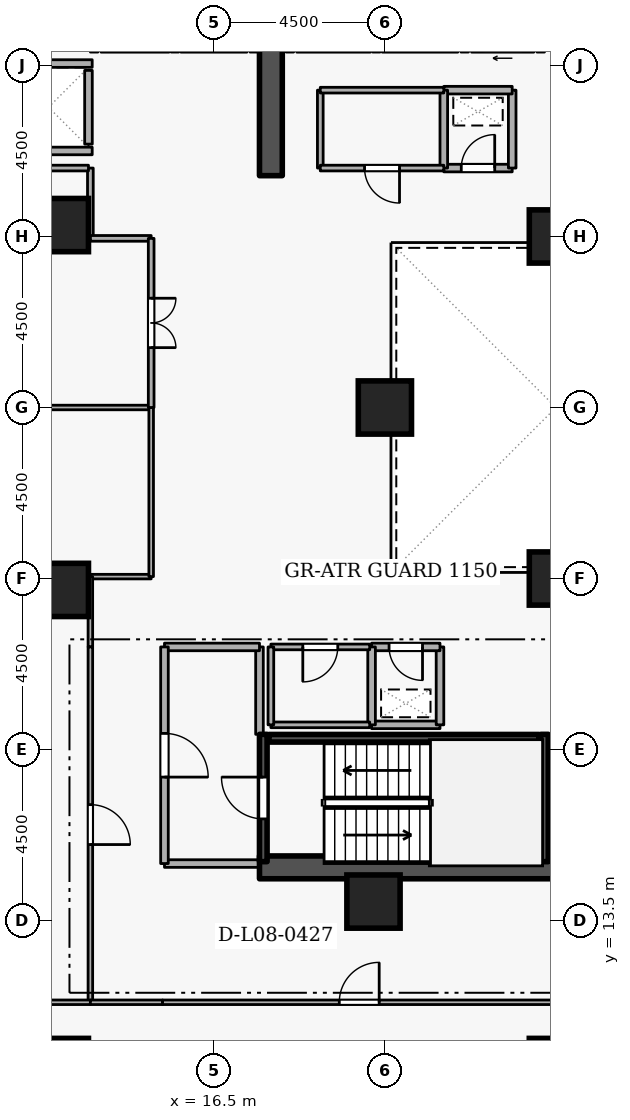
"""IFC4 building model, lengths in metres.
Left out: names, types, materials, properties, quantities, classifications, styles, units other than length and angle.
Written with IfcOpenShell. Run it as: python <this file> out.ifc"""

import sys

from ifc_helpers import new_model, si_unit, direction, frame, frame_2d, origin, origin_2d, place, context, subcontext, project, spatial, rectangle, extrude, element, fill, save


model = new_model("IFC4")
c1 = context("Model", 3, precision=1e-05, world=origin(), true_north=direction((0.0, 1.0)))
c2 = subcontext(c1, "Body", "Model", "MODEL_VIEW")
j1 = project(units=[si_unit("LENGTHUNIT", "METRE"), si_unit("PLANEANGLEUNIT", "RADIAN")], contexts=[c1])
p1 = place(None, origin())
s1 = spatial("IfcSite", under=j1, at=p1, CompositionType="ELEMENT")
p2 = place(p1, origin())
s2 = spatial("IfcBuilding", under=s1, at=p2, CompositionType="ELEMENT")
p3 = place(p2, frame((0.0, 0.0, 35.1)))
s3 = spatial("IfcBuildingStorey", under=s2, at=p3, CompositionType="ELEMENT", Elevation=35.1)
p4 = place(p3, frame((17.7, 14.9, 0.0), z_axis=(0.0, 0.0, 1.0), x_axis=(1.0, 0.0, 0.0)))
e1 = element("IfcWall", 1, at=p4, inside=s3, PredefinedType="SHEAR", context=c2, shape_type="SweptSolid", body=[
    extrude(rectangle(XDim=15.6, YDim=0.6, at=frame_2d((7.8, 0.0))), origin(), (0.0, 0.0, 1.0), 3.6),
])
p5 = place(p3, frame((18.0, 33.1, 0.0), z_axis=(0.0, 0.0, 1.0), x_axis=(0.0, 1.0, 0.0)))
e2 = element("IfcWall", 2, at=p5, inside=s3, PredefinedType="SHEAR", context=c2, shape_type="SweptSolid", body=[
    extrude(rectangle(XDim=5.7, YDim=0.6, at=frame_2d((2.85, 0.0))), origin(), (0.0, 0.0, 1.0), 3.6),
])
for number, where, z_axis, x_axis in (
    (3, (12.5, 9.7, 0.0), (0.0, 0.0, 1.0), (1.0, 0.0, 0.0)),
    (4, (25.5, 9.7, 0.0), (0.0, 0.0, 1.0), (1.0, 0.0, 0.0)),
    (5, (12.5, 22.2, 0.0), (0.0, 0.0, 1.0), (1.0, 0.0, 0.0)),
    (6, (12.5, 31.8, 0.0), (0.0, 0.0, 1.0), (1.0, 0.0, 0.0)),
    (7, (20.7, 14.0, 0.0), (0.0, 0.0, 1.0), (1.0, 0.0, 0.0)),
    (8, (25.5, 22.5, 0.0), (0.0, 0.0, 1.0), (1.0, 0.0, 0.0)),
    (9, (25.5, 31.5, 0.0), (0.0, 0.0, 1.0), (1.0, 0.0, 0.0)),
    (10, (21.0, 27.0, 0.0), (0.0, 0.0, 1.0), (1.0, 0.0, 0.0)),
):
    element("IfcColumn", number, at=place(p3, frame(where, z_axis=z_axis, x_axis=x_axis)), inside=s3, PredefinedType="COLUMN", context=c2, shape_type="SweptSolid", body=[
        extrude(rectangle(XDim=1.4, YDim=1.4, at=origin_2d()), origin(), (0.0, 0.0, 1.0), 3.6),
    ])
p6 = place(p3, frame((24.92, 36.45, 0.0), z_axis=(0.0, 0.0, 1.0), x_axis=(-1.0, 0.0, 0.0)))
e11 = element("IfcWall", 11, at=p6, inside=s3, PredefinedType="STANDARD", context=c2, shape_type="SweptSolid", body=[
    extrude(rectangle(XDim=1.64, YDim=0.2, at=frame_2d((0.82, 0.0))), origin(), (0.0, 0.0, 1.0), 3.34),
])
p7 = place(p6, frame((0.31, 0.0, 0.0)))
e12 = element("IfcOpeningElement", 12, at=p7, cuts=e11, PredefinedType="OPENING", context=c2, shape_type="SweptSolid", body=[
    extrude(rectangle(XDim=1.02, YDim=2.06, at=frame_2d((0.51, 1.03))), frame((0.0, 0.11, 0.0), z_axis=(0.0, -1.0, 0.0), x_axis=(1.0, 0.0, 0.0)), (0.0, 0.0, 1.0), 0.22),
])
p8 = place(p3, frame((22.92, 36.45, 0.0), z_axis=(0.0, 0.0, 1.0), x_axis=(-1.0, 0.0, 0.0)))
e13 = element("IfcWall", 13, at=p8, inside=s3, PredefinedType="STANDARD", context=c2, shape_type="SweptSolid", body=[
    extrude(rectangle(XDim=1.99, YDim=0.2, at=frame_2d((0.995, 0.0))), origin(), (0.0, 0.0, 1.0), 3.34),
])
p9 = place(p3, frame((20.62, 36.45, 0.0), z_axis=(0.0, 0.0, 1.0), x_axis=(-1.0, 0.0, 0.0)))
e14 = element("IfcWall", 14, at=p9, inside=s3, PredefinedType="STANDARD", context=c2, shape_type="SweptSolid", body=[
    extrude(rectangle(XDim=1.94, YDim=0.2, at=frame_2d((0.97, 0.0))), origin(), (0.0, 0.0, 1.0), 3.34),
])
p10 = place(p3, frame((17.37, 36.45, 0.0), z_axis=(0.0, 0.0, 1.0), x_axis=(-1.0, 0.0, 0.0)))
e15 = element("IfcWall", 15, at=p10, inside=s3, PredefinedType="STANDARD", context=c2, shape_type="SweptSolid", body=[
    extrude(rectangle(XDim=1.74, YDim=0.2, at=frame_2d((0.87, 0.0))), origin(), (0.0, 0.0, 1.0), 3.34),
])
p11 = place(p3, frame((15.32, 36.45, 0.0), z_axis=(0.0, 0.0, 1.0), x_axis=(-1.0, 0.0, 0.0)))
e16 = element("IfcWall", 16, at=p11, inside=s3, PredefinedType="STANDARD", context=c2, shape_type="SweptSolid", body=[
    extrude(rectangle(XDim=1.79, YDim=0.2, at=frame_2d((0.895, 0.0))), origin(), (0.0, 0.0, 1.0), 3.34),
])
p12 = place(p3, frame((13.2, 33.93, 0.0), z_axis=(0.0, 0.0, 1.0), x_axis=(0.0, 1.0, 0.0)))
e17 = element("IfcWall", 17, at=p12, inside=s3, PredefinedType="STANDARD", context=c2, shape_type="SweptSolid", body=[
    extrude(rectangle(XDim=1.94, YDim=0.2, at=frame_2d((0.97, 0.0))), origin(), (0.0, 0.0, 1.0), 3.34),
])
for number, where, z_axis, x_axis in (
    (18, (11.002, 36.05, 0.0), (0.0, 0.0, 1.0), (1.0, 0.0, 0.0)),
    (19, (11.002, 33.75, 0.0), (0.0, 0.0, 1.0), (1.0, 0.0, 0.0)),
):
    element("IfcWall", number, at=place(p3, frame(where, z_axis=z_axis, x_axis=x_axis)), inside=s3, PredefinedType="STANDARD", context=c2, shape_type="SweptSolid", body=[
        extrude(rectangle(XDim=2.296, YDim=0.2, at=frame_2d((1.148, 0.0))), origin(), (0.0, 0.0, 1.0), 3.34),
    ])
p13 = place(p3, frame((17.8, 15.05, 0.0), z_axis=(0.0, 0.0, 1.0), x_axis=(0.0, 1.0, 0.0)))
e20 = element("IfcWall", 20, at=p13, inside=s3, PredefinedType="SHEAR", context=c2, shape_type="SweptSolid", body=[
    extrude(rectangle(XDim=3.35, YDim=0.2, at=frame_2d((1.675, 0.0))), origin(), (0.0, 0.0, 1.0), 3.6),
])
p14 = place(p13, frame((1.125, 0.0, 0.0)))
e21 = element("IfcOpeningElement", 21, at=p14, cuts=e20, PredefinedType="OPENING", context=c2, shape_type="SweptSolid", body=[
    extrude(rectangle(XDim=1.1, YDim=2.1, at=frame_2d((0.55, 1.05))), frame((0.0, 0.11, 0.0), z_axis=(0.0, -1.0, 0.0), x_axis=(1.0, 0.0, 0.0)), (0.0, 0.0, 1.0), 0.22),
])
p15 = place(p3, frame((25.2, 18.4, 0.0), z_axis=(0.0, 0.0, 1.0), x_axis=(0.0, -1.0, 0.0)))
e22 = element("IfcWall", 22, at=p15, inside=s3, PredefinedType="SHEAR", context=c2, shape_type="SweptSolid", body=[
    extrude(rectangle(XDim=3.35, YDim=0.2, at=frame_2d((1.675, 0.0))), origin(), (0.0, 0.0, 1.0), 3.6),
])
p16 = place(p3, frame((25.05, 18.297, 0.0), z_axis=(0.0, 0.0, 1.0), x_axis=(-1.0, 0.0, 0.0)))
e23 = element("IfcWall", 23, at=p16, inside=s3, PredefinedType="SHEAR", context=c2, shape_type="SweptSolid", body=[
    extrude(rectangle(XDim=7.1, YDim=0.2, at=frame_2d((3.55, 0.0))), origin(), (0.0, 0.0, 1.0), 3.6),
])
p17 = place(p3, frame((15.2, 15.0, 0.0), z_axis=(0.0, 0.0, 1.0), x_axis=(1.0, 0.0, 0.0)))
e24 = element("IfcWall", 24, at=p17, inside=s3, PredefinedType="STANDARD", context=c2, shape_type="SweptSolid", body=[
    extrude(rectangle(XDim=2.5, YDim=0.2, at=frame_2d((1.25, 0.0))), origin(), (0.0, 0.0, 1.0), 3.34),
])
p18 = place(p3, frame((17.7, 18.4, 0.0), z_axis=(0.0, 0.0, 1.0), x_axis=(0.0, 1.0, 0.0)))
e25 = element("IfcWall", 25, at=p18, inside=s3, PredefinedType="STANDARD", context=c2, shape_type="SweptSolid", body=[
    extrude(rectangle(XDim=2.3, YDim=0.2, at=frame_2d((1.15, 0.0))), origin(), (0.0, 0.0, 1.0), 2.545),
])
p19 = place(p3, frame((17.7, 20.7, 0.0), z_axis=(0.0, 0.0, 1.0), x_axis=(-1.0, 0.0, 0.0)))
e26 = element("IfcWall", 26, at=p19, inside=s3, PredefinedType="STANDARD", context=c2, shape_type="SweptSolid", body=[
    extrude(rectangle(XDim=2.5, YDim=0.2, at=frame_2d((1.25, 0.0))), origin(), (0.0, 0.0, 1.0), 3.34),
])
p20 = place(p3, frame((15.2, 20.7, 0.0), z_axis=(0.0, 0.0, 1.0), x_axis=(0.0, -1.0, 0.0)))
e27 = element("IfcWall", 27, at=p20, inside=s3, PredefinedType="STANDARD", context=c2, shape_type="SweptSolid", body=[
    extrude(rectangle(XDim=5.7, YDim=0.2, at=frame_2d((2.85, 0.0))), origin(), (0.0, 0.0, 1.0), 3.34),
])
p21 = place(p20, frame((2.275, 0.0, 0.0)))
e28 = element("IfcOpeningElement", 28, at=p21, cuts=e27, PredefinedType="OPENING", context=c2, shape_type="SweptSolid", body=[
    extrude(rectangle(XDim=1.15, YDim=2.1, at=frame_2d((0.575, 1.05))), frame((0.0, 0.11, 0.0), z_axis=(0.0, -1.0, 0.0), x_axis=(1.0, 0.0, 0.0)), (0.0, 0.0, 1.0), 0.22),
])
p22 = place(p3, frame((20.65, 18.65, 0.0), z_axis=(0.0, 0.0, 1.0), x_axis=(1.0, 0.0, 0.0)))
e29 = element("IfcWall", 29, at=p22, inside=s3, PredefinedType="STANDARD", context=c2, shape_type="SweptSolid", body=[
    extrude(rectangle(XDim=1.8, YDim=0.2, at=frame_2d((0.9, 0.0))), origin(), (0.0, 0.0, 1.0), 3.34),
])
p23 = place(p3, frame((22.45, 18.65, 0.0), z_axis=(0.0, 0.0, 1.0), x_axis=(0.0, 1.0, 0.0)))
e30 = element("IfcWall", 30, at=p23, inside=s3, PredefinedType="STANDARD", context=c2, shape_type="SweptSolid", body=[
    extrude(rectangle(XDim=2.05, YDim=0.2, at=frame_2d((1.025, 0.0))), origin(), (0.0, 0.0, 1.0), 3.34),
])
p24 = place(p3, frame((22.45, 20.7, 0.0), z_axis=(0.0, 0.0, 1.0), x_axis=(-1.0, 0.0, 0.0)))
e31 = element("IfcWall", 31, at=p24, inside=s3, PredefinedType="STANDARD", context=c2, shape_type="SweptSolid", body=[
    extrude(rectangle(XDim=1.8, YDim=0.2, at=frame_2d((0.9, 0.0))), origin(), (0.0, 0.0, 1.0), 3.34),
])
p25 = place(p24, frame((0.46, 0.0, 0.0)))
e32 = element("IfcOpeningElement", 32, at=p25, cuts=e31, PredefinedType="OPENING", context=c2, shape_type="SweptSolid", body=[
    extrude(rectangle(XDim=0.88, YDim=2.04, at=frame_2d((0.44, 1.02))), frame((0.0, 0.11, 0.0), z_axis=(0.0, -1.0, 0.0), x_axis=(1.0, 0.0, 0.0)), (0.0, 0.0, 1.0), 0.22),
])
p26 = place(p3, frame((20.65, 20.7, 0.0), z_axis=(0.0, 0.0, 1.0), x_axis=(0.0, -1.0, 0.0)))
e33 = element("IfcWall", 33, at=p26, inside=s3, PredefinedType="STANDARD", context=c2, shape_type="SweptSolid", body=[
    extrude(rectangle(XDim=2.05, YDim=0.2, at=frame_2d((1.025, 0.0))), origin(), (0.0, 0.0, 1.0), 3.34),
])
p27 = place(p3, frame((22.55, 33.3, 0.0), z_axis=(0.0, 0.0, 1.0), x_axis=(1.0, 0.0, 0.0)))
e34 = element("IfcWall", 34, at=p27, inside=s3, PredefinedType="STANDARD", context=c2, shape_type="SweptSolid", body=[
    extrude(rectangle(XDim=1.8, YDim=0.2, at=frame_2d((0.9, 0.0))), origin(), (0.0, 0.0, 1.0), 3.34),
])
p28 = place(p27, frame((0.46, 0.0, 0.0)))
e35 = element("IfcOpeningElement", 35, at=p28, cuts=e34, PredefinedType="OPENING", context=c2, shape_type="SweptSolid", body=[
    extrude(rectangle(XDim=0.88, YDim=2.04, at=frame_2d((0.44, 1.02))), frame((0.0, 0.11, 0.0), z_axis=(0.0, -1.0, 0.0), x_axis=(1.0, 0.0, 0.0)), (0.0, 0.0, 1.0), 0.22),
])
p29 = place(p3, frame((24.35, 33.3, 0.0), z_axis=(0.0, 0.0, 1.0), x_axis=(0.0, 1.0, 0.0)))
e36 = element("IfcWall", 36, at=p29, inside=s3, PredefinedType="STANDARD", context=c2, shape_type="SweptSolid", body=[
    extrude(rectangle(XDim=2.05, YDim=0.2, at=frame_2d((1.025, 0.0))), origin(), (0.0, 0.0, 1.0), 3.34),
])
p30 = place(p3, frame((24.35, 35.35, 0.0), z_axis=(0.0, 0.0, 1.0), x_axis=(-1.0, 0.0, 0.0)))
e37 = element("IfcWall", 37, at=p30, inside=s3, PredefinedType="STANDARD", context=c2, shape_type="SweptSolid", body=[
    extrude(rectangle(XDim=1.8, YDim=0.2, at=frame_2d((0.9, 0.0))), origin(), (0.0, 0.0, 1.0), 3.34),
])
p31 = place(p3, frame((22.55, 35.35, 0.0), z_axis=(0.0, 0.0, 1.0), x_axis=(0.0, -1.0, 0.0)))
e38 = element("IfcWall", 38, at=p31, inside=s3, PredefinedType="STANDARD", context=c2, shape_type="SweptSolid", body=[
    extrude(rectangle(XDim=2.05, YDim=0.2, at=frame_2d((1.025, 0.0))), origin(), (0.0, 0.0, 1.0), 3.34),
])
p32 = place(p3, frame((18.0, 18.65, 0.0), z_axis=(0.0, 0.0, 1.0), x_axis=(1.0, 0.0, 0.0)))
e39 = element("IfcWall", 39, at=p32, inside=s3, PredefinedType="PARTITIONING", context=c2, shape_type="SweptSolid", body=[
    extrude(rectangle(XDim=2.6, YDim=0.15, at=frame_2d((1.3, 0.0))), origin(), (0.0, 0.0, 1.0), 3.34),
])
p33 = place(p3, frame((20.6, 20.7, 0.0), z_axis=(0.0, 0.0, 1.0), x_axis=(-1.0, 0.0, 0.0)))
e40 = element("IfcWall", 40, at=p33, inside=s3, PredefinedType="PARTITIONING", context=c2, shape_type="SweptSolid", body=[
    extrude(rectangle(XDim=2.6, YDim=0.15, at=frame_2d((1.3, 0.0))), origin(), (0.0, 0.0, 1.0), 3.34),
])
p34 = place(p33, frame((0.84, 0.0, 0.0)))
e41 = element("IfcOpeningElement", 41, at=p34, cuts=e40, PredefinedType="OPENING", context=c2, shape_type="SweptSolid", body=[
    extrude(rectangle(XDim=0.92, YDim=2.08, at=frame_2d((0.46, 1.04))), frame((0.0, 0.085, 0.0), z_axis=(0.0, -1.0, 0.0), x_axis=(1.0, 0.0, 0.0)), (0.0, 0.0, 1.0), 0.17),
])
p35 = place(p3, frame((18.0, 20.7, 0.0), z_axis=(0.0, 0.0, 1.0), x_axis=(0.0, -1.0, 0.0)))
e42 = element("IfcWall", 42, at=p35, inside=s3, PredefinedType="PARTITIONING", context=c2, shape_type="SweptSolid", body=[
    extrude(rectangle(XDim=2.05, YDim=0.15, at=frame_2d((1.025, 0.0))), origin(), (0.0, 0.0, 1.0), 2.545),
])
p36 = place(p3, frame((19.3, 33.3, 0.0), z_axis=(0.0, 0.0, 1.0), x_axis=(0.0, 1.0, 0.0)))
e43 = element("IfcWall", 43, at=p36, inside=s3, PredefinedType="PARTITIONING", context=c2, shape_type="SweptSolid", body=[
    extrude(rectangle(XDim=2.05, YDim=0.15, at=frame_2d((1.025, 0.0))), origin(), (0.0, 0.0, 1.0), 3.34),
])
p37 = place(p3, frame((19.3, 35.35, 0.0), z_axis=(0.0, 0.0, 1.0), x_axis=(1.0, 0.0, 0.0)))
e44 = element("IfcWall", 44, at=p37, inside=s3, PredefinedType="PARTITIONING", context=c2, shape_type="SweptSolid", body=[
    extrude(rectangle(XDim=3.25, YDim=0.15, at=frame_2d((1.625, 0.0))), origin(), (0.0, 0.0, 1.0), 3.34),
])
p38 = place(p3, frame((22.55, 33.3, 0.0), z_axis=(0.0, 0.0, 1.0), x_axis=(-1.0, 0.0, 0.0)))
e45 = element("IfcWall", 45, at=p38, inside=s3, PredefinedType="PARTITIONING", context=c2, shape_type="SweptSolid", body=[
    extrude(rectangle(XDim=3.25, YDim=0.15, at=frame_2d((1.625, 0.0))), origin(), (0.0, 0.0, 1.0), 3.34),
])
p39 = place(p38, frame((1.165, 0.0, 0.0)))
e46 = element("IfcOpeningElement", 46, at=p39, cuts=e45, PredefinedType="OPENING", context=c2, shape_type="SweptSolid", body=[
    extrude(rectangle(XDim=0.92, YDim=2.08, at=frame_2d((0.46, 1.04))), frame((0.0, 0.085, 0.0), z_axis=(0.0, -1.0, 0.0), x_axis=(1.0, 0.0, 0.0)), (0.0, 0.0, 1.0), 0.17),
])
p40 = place(p3, frame((14.85, 22.55, 0.0), z_axis=(0.0, 0.0, 1.0), x_axis=(-1.0, 0.0, 0.0)))
e47 = element("IfcWall", 47, at=p40, inside=s3, PredefinedType="PARTITIONING", context=c2, shape_type="SweptSolid", body=[
    extrude(rectangle(XDim=1.6, YDim=0.12, at=frame_2d((0.8, 0.0))), origin(), (0.0, 0.0, 1.0), 3.34),
])
p41 = place(p3, frame((13.25, 22.55, 0.0), z_axis=(0.0, 0.0, 1.0), x_axis=(0.0, -1.0, 0.0)))
e48 = element("IfcWall", 48, at=p41, inside=s3, PredefinedType="PARTITIONING", context=c2, shape_type="SweptSolid", body=[
    extrude(rectangle(XDim=1.85, YDim=0.12, at=frame_2d((0.925, 0.0))), origin(), (0.0, 0.0, 1.0), 3.34),
])
p42 = place(p3, frame((13.25, 20.7, 0.0), z_axis=(0.0, 0.0, 1.0), x_axis=(0.0, -1.0, 0.0)))
e49 = element("IfcWall", 49, at=p42, inside=s3, PredefinedType="PARTITIONING", context=c2, shape_type="SweptSolid", body=[
    extrude(rectangle(XDim=9.35, YDim=0.12, at=frame_2d((4.675, 0.0))), origin(), (0.0, 0.0, 1.0), 3.34),
])
p43 = place(p42, frame((4.15, 0.0, 0.0)))
e50 = element("IfcOpeningElement", 50, at=p43, cuts=e49, PredefinedType="OPENING", context=c2, shape_type="SweptSolid", body=[
    extrude(rectangle(XDim=1.05, YDim=2.1, at=frame_2d((0.525, 1.05))), frame((0.0, 0.07, 0.0), z_axis=(0.0, -1.0, 0.0), x_axis=(1.0, 0.0, 0.0)), (0.0, 0.0, 1.0), 0.14),
])
p44 = place(p3, frame((13.25, 11.35, 0.0), z_axis=(0.0, 0.0, 1.0), x_axis=(-1.0, 0.0, 0.0)))
e51 = element("IfcWall", 51, at=p44, inside=s3, PredefinedType="PARTITIONING", context=c2, shape_type="SweptSolid", body=[
    extrude(rectangle(XDim=11.97, YDim=0.12, at=frame_2d((5.985, 0.0))), origin(), (0.0, 0.0, 1.0), 3.34),
])
p45 = place(p3, frame((1.28, 27.0, 0.0), z_axis=(0.0, 0.0, 1.0), x_axis=(1.0, 0.0, 0.0)))
e52 = element("IfcWall", 52, at=p45, inside=s3, PredefinedType="PARTITIONING", context=c2, shape_type="SweptSolid", body=[
    extrude(rectangle(XDim=13.57, YDim=0.12, at=frame_2d((6.785, 0.0))), origin(), (0.0, 0.0, 1.0), 2.878),
])
p46 = place(p3, frame((14.85, 27.0, 0.0), z_axis=(0.0, 0.0, 1.0), x_axis=(0.0, -1.0, 0.0)))
e53 = element("IfcWall", 53, at=p46, inside=s3, PredefinedType="PARTITIONING", context=c2, shape_type="SweptSolid", body=[
    extrude(rectangle(XDim=4.45, YDim=0.12, at=frame_2d((2.225, 0.0))), origin(), (0.0, 0.0, 1.0), 3.34),
])
p47 = place(p3, frame((13.25, 33.3, 0.0), z_axis=(0.0, 0.0, 1.0), x_axis=(0.0, -1.0, 0.0)))
e54 = element("IfcWall", 54, at=p47, inside=s3, PredefinedType="PARTITIONING", context=c2, shape_type="SweptSolid", body=[
    extrude(rectangle(XDim=1.85, YDim=0.15, at=frame_2d((0.925, 0.0))), origin(), (0.0, 0.0, 1.0), 3.34),
])
p48 = place(p3, frame((13.25, 31.45, 0.0), z_axis=(0.0, 0.0, 1.0), x_axis=(1.0, 0.0, 0.0)))
e55 = element("IfcWall", 55, at=p48, inside=s3, PredefinedType="PARTITIONING", context=c2, shape_type="SweptSolid", body=[
    extrude(rectangle(XDim=1.6, YDim=0.15, at=frame_2d((0.8, 0.0))), origin(), (0.0, 0.0, 1.0), 3.34),
])
p49 = place(p3, frame((14.85, 31.45, 0.0), z_axis=(0.0, 0.0, 1.0), x_axis=(0.0, -1.0, 0.0)))
e56 = element("IfcWall", 56, at=p49, inside=s3, PredefinedType="PARTITIONING", context=c2, shape_type="SweptSolid", body=[
    extrude(rectangle(XDim=4.45, YDim=0.15, at=frame_2d((2.225, 0.0))), origin(), (0.0, 0.0, 1.0), 3.34),
])
p50 = place(p49, frame((1.575, 0.0, 0.0)))
e57 = element("IfcOpeningElement", 57, at=p50, cuts=e56, PredefinedType="OPENING", context=c2, shape_type="SweptSolid", body=[
    extrude(rectangle(XDim=1.3, YDim=2.12, at=frame_2d((0.65, 1.06))), frame((0.0, 0.085, 0.0), z_axis=(0.0, -1.0, 0.0), x_axis=(1.0, 0.0, 0.0)), (0.0, 0.0, 1.0), 0.17),
])
p51 = place(p3, frame((10.9, 33.3, 0.0), z_axis=(0.0, 0.0, 1.0), x_axis=(1.0, 0.0, 0.0)))
e58 = element("IfcWall", 58, at=p51, inside=s3, PredefinedType="PARTITIONING", context=c2, shape_type="SweptSolid", body=[
    extrude(rectangle(XDim=2.3, YDim=0.15, at=frame_2d((1.15, 0.0))), origin(), (0.0, 0.0, 1.0), 3.34),
])
p52 = place(p3, frame((13.25, 11.35, 0.0), z_axis=(0.0, 0.0, 1.0), x_axis=(1.0, 0.0, 0.0)))
e59 = element("IfcWall", 59, at=p52, inside=s3, PredefinedType="PARTITIONING", context=c2, shape_type="SweptSolid", body=[
    extrude(rectangle(XDim=1.9, YDim=0.12, at=frame_2d((0.95, 0.0))), origin(), (0.0, 0.0, 1.0), 3.34),
])
p53 = place(p3, frame((15.15, 11.35, 0.0), z_axis=(0.0, 0.0, 1.0), x_axis=(1.0, 0.0, 0.0)))
e60 = element("IfcWall", 60, at=p53, inside=s3, PredefinedType="PARTITIONING", context=c2, shape_type="SweptSolid", body=[
    extrude(rectangle(XDim=10.35, YDim=0.12, at=frame_2d((5.175, 0.0))), origin(), (0.0, 0.0, 1.0), 3.34),
])
p54 = place(p53, frame((4.65, 0.0, 0.0)))
e61 = element("IfcOpeningElement", 61, at=p54, cuts=e60, PredefinedType="OPENING", context=c2, shape_type="SweptSolid", body=[
    extrude(rectangle(XDim=1.05, YDim=2.1, at=frame_2d((0.525, 1.05))), frame((0.0, 0.07, 0.0), z_axis=(0.0, -1.0, 0.0), x_axis=(1.0, 0.0, 0.0)), (0.0, 0.0, 1.0), 0.14),
])
p55 = place(p14, origin())
e62 = element("IfcDoor", 62, at=p55, inside=s3, OperationType="SINGLE_SWING_RIGHT", PredefinedType="DOOR", context=c2, shape_type="SweptSolid", body=[
    extrude(rectangle(XDim=1.1, YDim=2.1, at=frame_2d((0.55, 1.05))), frame((0.0, 0.025, 0.0), z_axis=(0.0, -1.0, 0.0), x_axis=(1.0, 0.0, 0.0)), (0.0, 0.0, 1.0), 0.05),
])
fill(e21, e62)
p56 = place(p21, origin())
e63 = element("IfcDoor", 63, at=p56, inside=s3, OperationType="SINGLE_SWING_RIGHT", PredefinedType="DOOR", context=c2, shape_type="SweptSolid", body=[
    extrude(rectangle(XDim=1.15, YDim=2.1, at=frame_2d((0.575, 1.05))), frame((0.0, 0.025, 0.0), z_axis=(0.0, -1.0, 0.0), x_axis=(1.0, 0.0, 0.0)), (0.0, 0.0, 1.0), 0.05),
])
fill(e28, e63)
p57 = place(p25, origin())
e64 = element("IfcDoor", 64, at=p57, inside=s3, OperationType="SINGLE_SWING_LEFT", PredefinedType="DOOR", context=c2, shape_type="SweptSolid", body=[
    extrude(rectangle(XDim=0.88, YDim=2.04, at=frame_2d((0.44, 1.02))), frame((0.0, 0.025, 0.0), z_axis=(0.0, -1.0, 0.0), x_axis=(1.0, 0.0, 0.0)), (0.0, 0.0, 1.0), 0.05),
])
fill(e32, e64)
p58 = place(p28, origin())
e65 = element("IfcDoor", 65, at=p58, inside=s3, OperationType="SINGLE_SWING_RIGHT", PredefinedType="DOOR", context=c2, shape_type="SweptSolid", body=[
    extrude(rectangle(XDim=0.88, YDim=2.04, at=frame_2d((0.44, 1.02))), frame((0.0, 0.025, 0.0), z_axis=(0.0, -1.0, 0.0), x_axis=(1.0, 0.0, 0.0)), (0.0, 0.0, 1.0), 0.05),
])
fill(e35, e65)
p59 = place(p34, origin())
e66 = element("IfcDoor", 66, at=p59, inside=s3, OperationType="SINGLE_SWING_RIGHT", PredefinedType="DOOR", context=c2, shape_type="SweptSolid", body=[
    extrude(rectangle(XDim=0.92, YDim=2.08, at=frame_2d((0.46, 1.04))), frame((0.0, 0.025, 0.0), z_axis=(0.0, -1.0, 0.0), x_axis=(1.0, 0.0, 0.0)), (0.0, 0.0, 1.0), 0.05),
])
fill(e41, e66)
p60 = place(p39, origin())
e67 = element("IfcDoor", 67, at=p60, inside=s3, OperationType="SINGLE_SWING_LEFT", PredefinedType="DOOR", context=c2, shape_type="SweptSolid", body=[
    extrude(rectangle(XDim=0.92, YDim=2.08, at=frame_2d((0.46, 1.04))), frame((0.0, 0.025, 0.0), z_axis=(0.0, -1.0, 0.0), x_axis=(1.0, 0.0, 0.0)), (0.0, 0.0, 1.0), 0.05),
])
fill(e46, e67)
p61 = place(p43, origin())
e68 = element("IfcDoor", 68, at=p61, inside=s3, OperationType="SINGLE_SWING_RIGHT", PredefinedType="DOOR", context=c2, shape_type="SweptSolid", body=[
    extrude(rectangle(XDim=1.05, YDim=2.1, at=frame_2d((0.525, 1.05))), frame((0.0, 0.025, 0.0), z_axis=(0.0, -1.0, 0.0), x_axis=(1.0, 0.0, 0.0)), (0.0, 0.0, 1.0), 0.05),
])
fill(e50, e68)
p62 = place(p50, origin())
e69 = element("IfcDoor", 69, at=p62, inside=s3, OperationType="DOUBLE_DOOR_SINGLE_SWING", PredefinedType="DOOR", context=c2, shape_type="SweptSolid", body=[
    extrude(rectangle(XDim=1.3, YDim=2.12, at=frame_2d((0.65, 1.06))), frame((0.0, 0.025, 0.0), z_axis=(0.0, -1.0, 0.0), x_axis=(1.0, 0.0, 0.0)), (0.0, 0.0, 1.0), 0.05),
])
fill(e57, e69)
p63 = place(p54, origin())
e70 = element("IfcDoor", 70, at=p63, inside=s3, OperationType="SINGLE_SWING_RIGHT", PredefinedType="DOOR", context=c2, shape_type="SweptSolid", body=[
    extrude(rectangle(XDim=1.05, YDim=2.1, at=frame_2d((0.525, 1.05))), frame((0.0, 0.025, 0.0), z_axis=(0.0, -1.0, 0.0), x_axis=(1.0, 0.0, 0.0)), (0.0, 0.0, 1.0), 0.05),
])
fill(e61, e70)
save(model, sys.argv[1])
